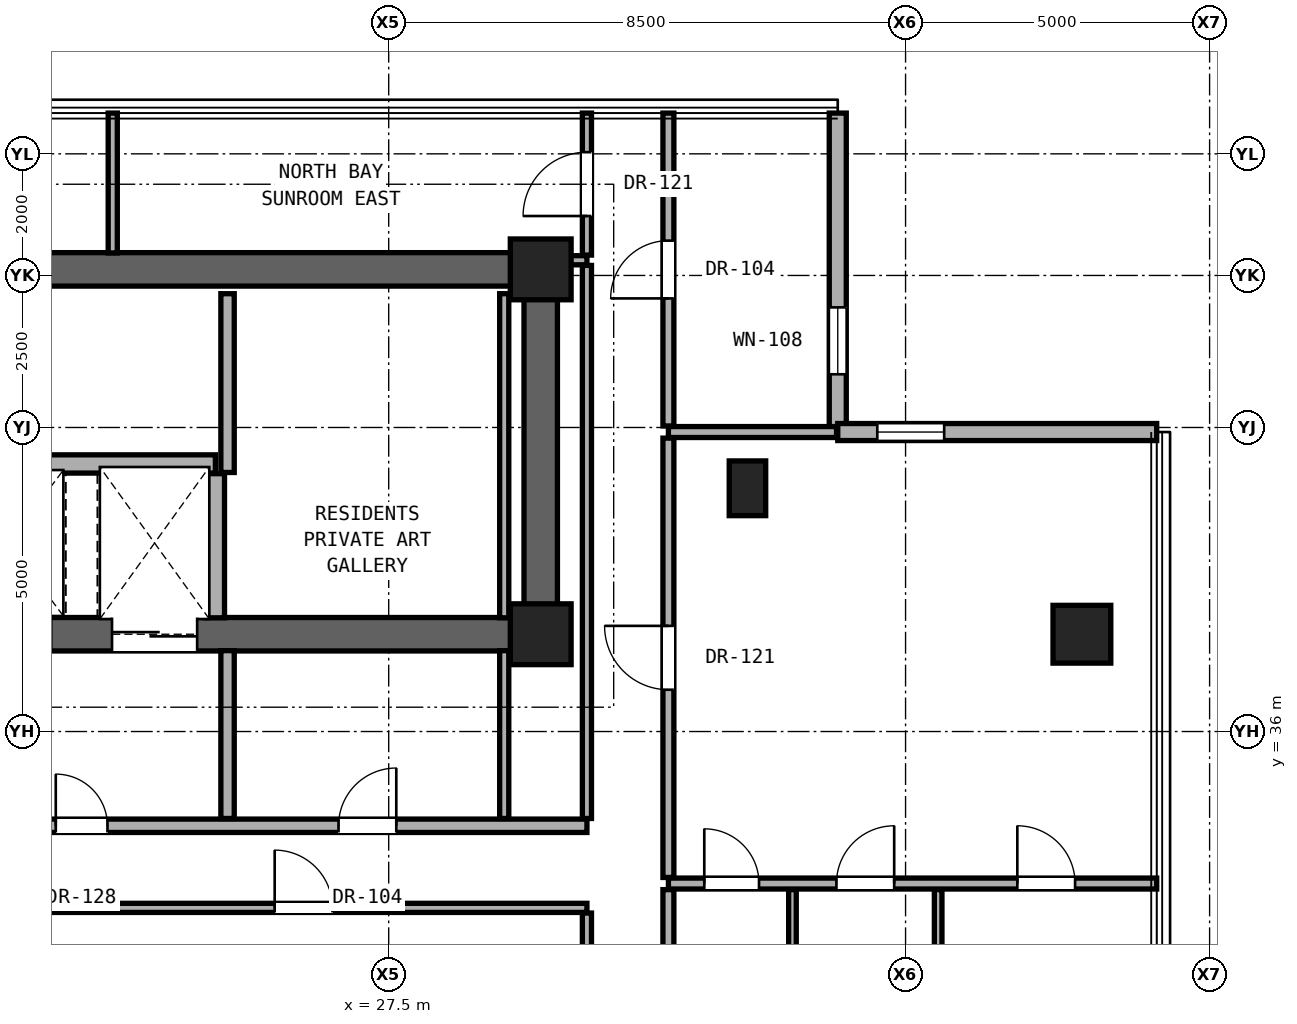
"""IFC4 building model, lengths in metres.
Left out: names, types, materials, properties, quantities, classifications, styles, units other than length and angle.
Written with IfcOpenShell. Run it as: python <this file> out.ifc"""

import sys

from ifc_helpers import new_model, si_unit, direction, frame, frame_2d, origin, origin_2d, place, context, subcontext, project, spatial, rectangle, hollow_rectangle, extrude, element, fill, save


model = new_model("IFC4")
c1 = context("Model", 3, precision=1e-05, world=origin(), true_north=direction((0.0, 1.0)))
c2 = subcontext(c1, "Body", "Model", "MODEL_VIEW")
j1 = project(units=[si_unit("LENGTHUNIT", "METRE"), si_unit("PLANEANGLEUNIT", "RADIAN")], contexts=[c1])
p1 = place(None, origin())
s1 = spatial("IfcSite", under=j1, at=p1, CompositionType="ELEMENT")
p2 = place(p1, origin())
s2 = spatial("IfcBuilding", under=s1, at=p2, CompositionType="ELEMENT")
p3 = place(p2, frame((0.0, 0.0, 154.4)))
s3 = spatial("IfcBuildingStorey", under=s2, at=p3, CompositionType="ELEMENT", Elevation=154.4)
for number, where, z_axis, x_axis in (
    (1, (30.0, 37.6, 0.0), (0.0, 0.0, 1.0), (1.0, 0.0, 0.0)),
    (2, (30.0, 43.6, 0.0), (0.0, 0.0, 1.0), (1.0, 0.0, 0.0)),
):
    element("IfcColumn", number, at=place(p3, frame(where, z_axis=z_axis, x_axis=x_axis)), inside=s3, PredefinedType="COLUMN", context=c2, shape_type="SweptSolid", body=[
        extrude(rectangle(XDim=1.0, YDim=1.0, at=origin_2d()), origin(), (0.0, 0.0, 1.0), 3.25),
    ])
p4 = place(p3, frame((38.9, 37.6, 0.0), z_axis=(0.0, 0.0, 1.0), x_axis=(1.0, 0.0, 0.0)))
e3 = element("IfcColumn", 3, at=p4, inside=s3, PredefinedType="COLUMN", context=c2, shape_type="SweptSolid", body=[
    extrude(hollow_rectangle(XDim=0.95, YDim=0.95, WallThickness=0.05, at=origin_2d()), origin(), (0.0, 0.0, 1.0), 3.25),
])
p5 = place(p3, frame((33.4, 40.0, 0.0), z_axis=(0.0, 0.0, 1.0), x_axis=(1.0, 0.0, 0.0)))
e4 = element("IfcColumn", 4, at=p5, inside=s3, PredefinedType="PILASTER", context=c2, shape_type="SweptSolid", body=[
    extrude(rectangle(XDim=0.6, YDim=0.9, at=origin_2d()), origin(), (0.0, 0.0, 1.0), 3.25),
])
p6 = place(p3, frame((11.0, 43.6, 0.0), z_axis=(0.0, 0.0, 1.0), x_axis=(1.0, 0.0, 0.0)))
e5 = element("IfcWall", 5, at=p6, inside=s3, PredefinedType="SHEAR", context=c2, shape_type="SweptSolid", body=[
    extrude(rectangle(XDim=19.0, YDim=0.55, at=frame_2d((9.5, 0.0))), origin(), (0.0, 0.0, 1.0), 3.05),
])
p7 = place(p3, frame((30.0, 37.6, 0.0), z_axis=(0.0, 0.0, 1.0), x_axis=(0.0, 1.0, 0.0)))
e6 = element("IfcWall", 6, at=p7, inside=s3, PredefinedType="SHEAR", context=c2, shape_type="SweptSolid", body=[
    extrude(rectangle(XDim=6.0, YDim=0.55, at=frame_2d((3.0, 0.0))), origin(), (0.0, 0.0, 1.0), 3.05),
])
p8 = place(p3, frame((11.0, 37.6, 0.0), z_axis=(0.0, 0.0, 1.0), x_axis=(1.0, 0.0, 0.0)))
e7 = element("IfcWall", 7, at=p8, inside=s3, PredefinedType="SHEAR", context=c2, shape_type="SweptSolid", body=[
    extrude(rectangle(XDim=19.0, YDim=0.55, at=frame_2d((9.5, 0.0))), origin(), (0.0, 0.0, 1.0), 3.05),
])
p9 = place(p8, frame((1.06, 0.0, 0.0)))
e8 = element("IfcOpeningElement", 8, at=p9, cuts=e7, PredefinedType="OPENING", context=c2, shape_type="SweptSolid", body=[
    extrude(rectangle(XDim=1.15, YDim=2.2, at=frame_2d((0.575, 1.1))), frame((0.0, 0.285, 0.0), z_axis=(0.0, -1.0, 0.0), x_axis=(1.0, 0.0, 0.0)), (0.0, 0.0, 1.0), 0.57),
])
p10 = place(p8, frame((9.55, 0.0, 0.0)))
e9 = element("IfcOpeningElement", 9, at=p10, cuts=e7, PredefinedType="OPENING", context=c2, shape_type="SweptSolid", body=[
    extrude(rectangle(XDim=1.4, YDim=2.35, at=frame_2d((0.7, 1.175))), frame((0.0, 0.285, 0.0), z_axis=(0.0, -1.0, 0.0), x_axis=(1.0, 0.0, 0.0)), (0.0, 0.0, 1.0), 0.57),
])
p11 = place(p8, frame((11.95, 0.0, 0.0)))
e10 = element("IfcOpeningElement", 10, at=p11, cuts=e7, PredefinedType="OPENING", context=c2, shape_type="SweptSolid", body=[
    extrude(rectangle(XDim=1.4, YDim=2.35, at=frame_2d((0.7, 1.175))), frame((0.0, 0.285, 0.0), z_axis=(0.0, -1.0, 0.0), x_axis=(1.0, 0.0, 0.0)), (0.0, 0.0, 1.0), 0.57),
])
p12 = place(p3, frame((34.885, 40.925, 0.0), z_axis=(0.0, 0.0, 1.0), x_axis=(0.0, 1.0, 0.0)))
e11 = element("IfcWall", 11, at=p12, inside=s3, PredefinedType="SOLIDWALL", context=c2, shape_type="SweptSolid", body=[
    extrude(rectangle(XDim=5.245, YDim=0.28, at=frame_2d((2.623, 0.0))), origin(), (0.0, 0.0, 1.0), 3.03),
])
p13 = place(p12, frame((0.95, 0.0, 0.85)))
e12 = element("IfcOpeningElement", 12, at=p13, cuts=e11, PredefinedType="OPENING", context=c2, shape_type="SweptSolid", body=[
    extrude(rectangle(XDim=1.1, YDim=2.0, at=frame_2d((0.55, 1.0))), frame((0.0, 0.15, 0.0), z_axis=(0.0, -1.0, 0.0), x_axis=(1.0, 0.0, 0.0)), (0.0, 0.0, 1.0), 0.3),
])
p14 = place(p3, frame((40.13, 40.925, 0.0), z_axis=(0.0, 0.0, 1.0), x_axis=(-1.0, 0.0, 0.0)))
e13 = element("IfcWall", 13, at=p14, inside=s3, PredefinedType="SOLIDWALL", context=c2, shape_type="SweptSolid", body=[
    extrude(rectangle(XDim=5.245, YDim=0.28, at=frame_2d((2.623, 0.0))), origin(), (0.0, 0.0, 1.0), 3.03),
])
p15 = place(p14, frame((3.495, 0.0, 0.85)))
e14 = element("IfcOpeningElement", 14, at=p15, cuts=e13, PredefinedType="OPENING", context=c2, shape_type="SweptSolid", body=[
    extrude(rectangle(XDim=1.1, YDim=2.0, at=frame_2d((0.55, 1.0))), frame((0.0, 0.15, 0.0), z_axis=(0.0, -1.0, 0.0), x_axis=(1.0, 0.0, 0.0)), (0.0, 0.0, 1.0), 0.3),
])
p16 = place(p3, frame((21.44, 33.1, 0.0), z_axis=(0.0, 0.0, 1.0), x_axis=(1.0, 0.0, 0.0)))
e15 = element("IfcWall", 15, at=p16, inside=s3, PredefinedType="PARTITIONING", context=c2, shape_type="SweptSolid", body=[
    extrude(rectangle(XDim=9.32, YDim=0.15, at=frame_2d((4.66, 0.0))), origin(), (0.0, 0.0, 1.0), 2.186),
])
p17 = place(p16, frame((4.185, 0.0, 0.0)))
e16 = element("IfcOpeningElement", 16, at=p17, cuts=e15, PredefinedType="OPENING", context=c2, shape_type="SweptSolid", body=[
    extrude(rectangle(XDim=0.95, YDim=2.15, at=frame_2d((0.475, 1.075))), frame((0.0, 0.085, 0.0), z_axis=(0.0, -1.0, 0.0), x_axis=(1.0, 0.0, 0.0)), (0.0, 0.0, 1.0), 0.17),
])
p18 = place(p3, frame((32.1, 33.5, 0.0), z_axis=(0.0, 0.0, 1.0), x_axis=(1.0, 0.0, 0.0)))
e17 = element("IfcWall", 17, at=p18, inside=s3, PredefinedType="PARTITIONING", context=c2, shape_type="SweptSolid", body=[
    extrude(rectangle(XDim=8.03, YDim=0.18, at=frame_2d((4.015, 0.0))), origin(), (0.0, 0.0, 1.0), 2.269),
])
p19 = place(p18, frame((5.738, 0.0, 0.0)))
e18 = element("IfcOpeningElement", 18, at=p19, cuts=e17, PredefinedType="OPENING", context=c2, shape_type="SweptSolid", body=[
    extrude(rectangle(XDim=0.95, YDim=2.15, at=frame_2d((0.475, 1.075))), frame((0.0, 0.1, 0.0), z_axis=(0.0, -1.0, 0.0), x_axis=(1.0, 0.0, 0.0)), (0.0, 0.0, 1.0), 0.2),
])
p20 = place(p18, frame((2.763, 0.0, 0.0)))
e19 = element("IfcOpeningElement", 19, at=p20, cuts=e17, PredefinedType="OPENING", context=c2, shape_type="SweptSolid", body=[
    extrude(rectangle(XDim=0.95, YDim=2.15, at=frame_2d((0.475, 1.075))), frame((0.0, 0.1, 0.0), z_axis=(0.0, -1.0, 0.0), x_axis=(1.0, 0.0, 0.0)), (0.0, 0.0, 1.0), 0.2),
])
p21 = place(p18, frame((0.59, 0.0, 0.0)))
e20 = element("IfcOpeningElement", 20, at=p21, cuts=e17, PredefinedType="OPENING", context=c2, shape_type="SweptSolid", body=[
    extrude(rectangle(XDim=0.9, YDim=2.1, at=frame_2d((0.45, 1.05))), frame((0.0, 0.1, 0.0), z_axis=(0.0, -1.0, 0.0), x_axis=(1.0, 0.0, 0.0)), (0.0, 0.0, 1.0), 0.2),
])
p22 = place(p3, frame((15.59, 34.45, 0.0), z_axis=(0.0, 0.0, 1.0), x_axis=(1.0, 0.0, 0.0)))
e21 = element("IfcWall", 21, at=p22, inside=s3, PredefinedType="SOLIDWALL", context=c2, shape_type="SweptSolid", body=[
    extrude(rectangle(XDim=15.17, YDim=0.22, at=frame_2d((7.585, 0.0))), origin(), (0.0, 0.0, 1.0), 2.186),
])
p23 = place(p22, frame((6.435, 0.0, 0.0)))
e22 = element("IfcOpeningElement", 22, at=p23, cuts=e21, PredefinedType="OPENING", context=c2, shape_type="SweptSolid", body=[
    extrude(rectangle(XDim=0.85, YDim=2.01, at=frame_2d((0.425, 1.005))), frame((0.0, 0.12, 0.0), z_axis=(0.0, -1.0, 0.0), x_axis=(1.0, 0.0, 0.0)), (0.0, 0.0, 1.0), 0.24),
])
p24 = place(p22, frame((11.085, 0.0, 0.0)))
e23 = element("IfcOpeningElement", 23, at=p24, cuts=e21, PredefinedType="OPENING", context=c2, shape_type="SweptSolid", body=[
    extrude(rectangle(XDim=0.95, YDim=2.15, at=frame_2d((0.475, 1.075))), frame((0.0, 0.12, 0.0), z_axis=(0.0, -1.0, 0.0), x_axis=(1.0, 0.0, 0.0)), (0.0, 0.0, 1.0), 0.24),
])
p25 = place(p22, frame((1.775, 0.0, 0.0)))
e24 = element("IfcOpeningElement", 24, at=p25, cuts=e21, PredefinedType="OPENING", context=c2, shape_type="SweptSolid", body=[
    extrude(rectangle(XDim=0.85, YDim=2.01, at=frame_2d((0.425, 1.005))), frame((0.0, 0.12, 0.0), z_axis=(0.0, -1.0, 0.0), x_axis=(1.0, 0.0, 0.0)), (0.0, 0.0, 1.0), 0.24),
])
p26 = place(p3, frame((20.25, 40.4, 0.0), z_axis=(0.0, 0.0, 1.0), x_axis=(1.0, 0.0, 0.0)))
e25 = element("IfcWall", 25, at=p26, inside=s3, PredefinedType="SOLIDWALL", context=c2, shape_type="SweptSolid", body=[
    extrude(rectangle(XDim=4.4, YDim=0.3, at=frame_2d((2.2, 0.0))), origin(), (0.0, 0.0, 1.0), 3.05),
])
p27 = place(p3, frame((32.1, 40.925, 0.0), z_axis=(0.0, 0.0, 1.0), x_axis=(1.0, 0.0, 0.0)))
e26 = element("IfcWall", 26, at=p27, inside=s3, PredefinedType="PARTITIONING", context=c2, shape_type="SweptSolid", body=[
    extrude(rectangle(XDim=2.765, YDim=0.18, at=frame_2d((1.382, 0.0))), origin(), (0.0, 0.0, 1.0), 3.05),
])
p28 = place(p3, frame((30.27, 43.75, 0.0), z_axis=(0.0, 0.0, 1.0), x_axis=(1.0, 0.0, 0.0)))
e27 = element("IfcWall", 27, at=p28, inside=s3, PredefinedType="PARTITIONING", context=c2, shape_type="SweptSolid", body=[
    extrude(rectangle(XDim=0.49, YDim=0.15, at=frame_2d((0.245, 0.0))), origin(), (0.0, 0.0, 1.0), 3.05),
])
p29 = place(p3, frame((22.962, 43.87, 0.0), z_axis=(0.0, 0.0, 1.0), x_axis=(0.0, 1.0, 0.0)))
e28 = element("IfcWall", 28, at=p29, inside=s3, PredefinedType="PARTITIONING", context=c2, shape_type="SweptSolid", body=[
    extrude(rectangle(XDim=2.3, YDim=0.15, at=frame_2d((1.15, 0.0))), origin(), (0.0, 0.0, 1.0), 3.05),
])
p30 = place(p3, frame((24.65, 37.87, 0.0), z_axis=(0.0, 0.0, 1.0), x_axis=(0.0, 1.0, 0.0)))
e29 = element("IfcWall", 29, at=p30, inside=s3, PredefinedType="SOLIDWALL", context=c2, shape_type="SweptSolid", body=[
    extrude(rectangle(XDim=2.37, YDim=0.3, at=frame_2d((1.185, 0.0))), origin(), (0.0, 0.0, 1.0), 3.05),
])
p31 = place(p3, frame((24.85, 34.57, 0.0), z_axis=(0.0, 0.0, 1.0), x_axis=(0.0, 1.0, 0.0)))
e30 = element("IfcWall", 30, at=p31, inside=s3, PredefinedType="SOLIDWALL", context=c2, shape_type="SweptSolid", body=[
    extrude(rectangle(XDim=2.76, YDim=0.22, at=frame_2d((1.38, 0.0))), origin(), (0.0, 0.0, 1.0), 3.05),
])
p32 = place(p3, frame((24.85, 40.26, 0.0), z_axis=(0.0, 0.0, 1.0), x_axis=(0.0, 1.0, 0.0)))
e31 = element("IfcWall", 31, at=p32, inside=s3, PredefinedType="SOLIDWALL", context=c2, shape_type="SweptSolid", body=[
    extrude(rectangle(XDim=2.94, YDim=0.22, at=frame_2d((1.47, 0.0))), origin(), (0.0, 0.0, 1.0), 3.05),
])
p33 = place(p3, frame((29.4, 34.57, 0.0), z_axis=(0.0, 0.0, 1.0), x_axis=(0.0, 1.0, 0.0)))
e32 = element("IfcWall", 32, at=p33, inside=s3, PredefinedType="PARTITIONING", context=c2, shape_type="SweptSolid", body=[
    extrude(rectangle(XDim=2.76, YDim=0.15, at=frame_2d((1.38, 0.0))), origin(), (0.0, 0.0, 1.0), 3.05),
])
p34 = place(p3, frame((29.4, 37.87, 0.0), z_axis=(0.0, 0.0, 1.0), x_axis=(0.0, 1.0, 0.0)))
e33 = element("IfcWall", 33, at=p34, inside=s3, PredefinedType="PARTITIONING", context=c2, shape_type="SweptSolid", body=[
    extrude(rectangle(XDim=5.33, YDim=0.15, at=frame_2d((2.665, 0.0))), origin(), (0.0, 0.0, 1.0), 3.05),
])
p35 = place(p3, frame((30.76, 27.485, 0.0), z_axis=(0.0, 0.0, 1.0), x_axis=(0.0, 1.0, 0.0)))
e34 = element("IfcWall", 34, at=p35, inside=s3, PredefinedType="PARTITIONING", context=c2, shape_type="SweptSolid", body=[
    extrude(rectangle(XDim=5.53, YDim=0.15, at=frame_2d((2.765, 0.0))), origin(), (0.0, 0.0, 1.0), 2.346),
])
p36 = place(p3, frame((30.76, 34.57, 0.0), z_axis=(0.0, 0.0, 1.0), x_axis=(0.0, 1.0, 0.0)))
e35 = element("IfcWall", 35, at=p36, inside=s3, PredefinedType="PARTITIONING", context=c2, shape_type="SweptSolid", body=[
    extrude(rectangle(XDim=9.095, YDim=0.15, at=frame_2d((4.547, 0.0))), origin(), (0.0, 0.0, 1.0), 2.442),
])
p37 = place(p3, frame((30.76, 43.835, 0.0), z_axis=(0.0, 0.0, 1.0), x_axis=(0.0, 1.0, 0.0)))
e36 = element("IfcWall", 36, at=p37, inside=s3, PredefinedType="PARTITIONING", context=c2, shape_type="SweptSolid", body=[
    extrude(rectangle(XDim=2.335, YDim=0.15, at=frame_2d((1.167, 0.0))), origin(), (0.0, 0.0, 1.0), 3.05),
])
p38 = place(p37, frame((0.643, 0.0, 0.0)))
e37 = element("IfcOpeningElement", 37, at=p38, cuts=e36, PredefinedType="OPENING", context=c2, shape_type="SweptSolid", body=[
    extrude(rectangle(XDim=1.05, YDim=2.2, at=frame_2d((0.525, 1.1))), frame((0.0, 0.085, 0.0), z_axis=(0.0, -1.0, 0.0), x_axis=(1.0, 0.0, 0.0)), (0.0, 0.0, 1.0), 0.17),
])
p39 = place(p3, frame((32.1, 31.272, 0.0), z_axis=(0.0, 0.0, 1.0), x_axis=(0.0, 1.0, 0.0)))
e38 = element("IfcWall", 38, at=p39, inside=s3, PredefinedType="PARTITIONING", context=c2, shape_type="SweptSolid", body=[
    extrude(rectangle(XDim=2.127, YDim=0.18, at=frame_2d((1.064, 0.0))), origin(), (0.0, 0.0, 1.0), 2.346),
])
p40 = place(p3, frame((32.1, 33.6, 0.0), z_axis=(0.0, 0.0, 1.0), x_axis=(0.0, 1.0, 0.0)))
e39 = element("IfcWall", 39, at=p40, inside=s3, PredefinedType="PARTITIONING", context=c2, shape_type="SweptSolid", body=[
    extrude(rectangle(XDim=7.225, YDim=0.18, at=frame_2d((3.612, 0.0))), origin(), (0.0, 0.0, 1.0), 2.442),
])
p41 = place(p40, frame((3.087, 0.0, 0.0)))
e40 = element("IfcOpeningElement", 40, at=p41, cuts=e39, PredefinedType="OPENING", context=c2, shape_type="SweptSolid", body=[
    extrude(rectangle(XDim=1.05, YDim=2.2, at=frame_2d((0.525, 1.1))), frame((0.0, 0.1, 0.0), z_axis=(0.0, -1.0, 0.0), x_axis=(1.0, 0.0, 0.0)), (0.0, 0.0, 1.0), 0.2),
])
p42 = place(p3, frame((32.1, 41.025, 0.0), z_axis=(0.0, 0.0, 1.0), x_axis=(0.0, 1.0, 0.0)))
e41 = element("IfcWall", 41, at=p42, inside=s3, PredefinedType="PARTITIONING", context=c2, shape_type="SweptSolid", body=[
    extrude(rectangle(XDim=5.145, YDim=0.18, at=frame_2d((2.573, 0.0))), origin(), (0.0, 0.0, 1.0), 3.05),
])
p43 = place(p42, frame((2.097, 0.0, 0.0)))
e42 = element("IfcOpeningElement", 42, at=p43, cuts=e41, PredefinedType="OPENING", context=c2, shape_type="SweptSolid", body=[
    extrude(rectangle(XDim=0.95, YDim=2.15, at=frame_2d((0.475, 1.075))), frame((0.0, 0.1, 0.0), z_axis=(0.0, -1.0, 0.0), x_axis=(1.0, 0.0, 0.0)), (0.0, 0.0, 1.0), 0.2),
])
for number, where, z_axis, x_axis in (
    (43, (34.14, 31.272, 0.0), (0.0, 0.0, 1.0), (0.0, 1.0, 0.0)),
    (44, (36.536, 31.272, 0.0), (0.0, 0.0, 1.0), (0.0, 1.0, 0.0)),
):
    element("IfcWall", number, at=place(p3, frame(where, z_axis=z_axis, x_axis=x_axis)), inside=s3, PredefinedType="PARTITIONING", context=c2, shape_type="SweptSolid", body=[
        extrude(rectangle(XDim=2.127, YDim=0.125, at=frame_2d((1.064, 0.0))), origin(), (0.0, 0.0, 1.0), 2.346),
    ])
p44 = place(p13, origin())
e45 = element("IfcWindow", 45, at=p44, inside=s3, PartitioningType="SINGLE_PANEL", PredefinedType="WINDOW", context=c2, shape_type="SweptSolid", body=[
    extrude(rectangle(XDim=1.1, YDim=2.0, at=frame_2d((0.55, 1.0))), frame((0.0, 0.03, 0.0), z_axis=(0.0, -1.0, 0.0), x_axis=(1.0, 0.0, 0.0)), (0.0, 0.0, 1.0), 0.06),
])
fill(e12, e45)
p45 = place(p15, origin())
e46 = element("IfcWindow", 46, at=p45, inside=s3, PartitioningType="SINGLE_PANEL", PredefinedType="WINDOW", context=c2, shape_type="SweptSolid", body=[
    extrude(rectangle(XDim=1.1, YDim=2.0, at=frame_2d((0.55, 1.0))), frame((0.0, 0.03, 0.0), z_axis=(0.0, -1.0, 0.0), x_axis=(1.0, 0.0, 0.0)), (0.0, 0.0, 1.0), 0.06),
])
fill(e14, e46)
p46 = place(p23, origin())
e47 = element("IfcDoor", 47, at=p46, inside=s3, OperationType="SINGLE_SWING_LEFT", PredefinedType="DOOR", context=c2, shape_type="SweptSolid", body=[
    extrude(rectangle(XDim=0.85, YDim=2.01, at=frame_2d((0.425, 1.005))), frame((0.0, 0.025, 0.0), z_axis=(0.0, -1.0, 0.0), x_axis=(1.0, 0.0, 0.0)), (0.0, 0.0, 1.0), 0.05),
])
fill(e22, e47)
p47 = place(p24, origin())
e48 = element("IfcDoor", 48, at=p47, inside=s3, OperationType="SINGLE_SWING_RIGHT", PredefinedType="DOOR", context=c2, shape_type="SweptSolid", body=[
    extrude(rectangle(XDim=0.95, YDim=2.15, at=frame_2d((0.475, 1.075))), frame((0.0, 0.025, 0.0), z_axis=(0.0, -1.0, 0.0), x_axis=(1.0, 0.0, 0.0)), (0.0, 0.0, 1.0), 0.05),
])
fill(e23, e48)
p48 = place(p41, origin())
e49 = element("IfcDoor", 49, at=p48, inside=s3, OperationType="SINGLE_SWING_RIGHT", PredefinedType="DOOR", context=c2, shape_type="SweptSolid", body=[
    extrude(rectangle(XDim=1.05, YDim=2.2, at=frame_2d((0.525, 1.1))), frame((0.0, 0.025, 0.0), z_axis=(0.0, -1.0, 0.0), x_axis=(1.0, 0.0, 0.0)), (0.0, 0.0, 1.0), 0.05),
])
fill(e40, e49)
p49 = place(p19, origin())
e50 = element("IfcDoor", 50, at=p49, inside=s3, OperationType="SINGLE_SWING_LEFT", PredefinedType="DOOR", context=c2, shape_type="SweptSolid", body=[
    extrude(rectangle(XDim=0.95, YDim=2.15, at=frame_2d((0.475, 1.075))), frame((0.0, 0.025, 0.0), z_axis=(0.0, -1.0, 0.0), x_axis=(1.0, 0.0, 0.0)), (0.0, 0.0, 1.0), 0.05),
])
fill(e18, e50)
p50 = place(p20, origin())
e51 = element("IfcDoor", 51, at=p50, inside=s3, OperationType="SINGLE_SWING_RIGHT", PredefinedType="DOOR", context=c2, shape_type="SweptSolid", body=[
    extrude(rectangle(XDim=0.95, YDim=2.15, at=frame_2d((0.475, 1.075))), frame((0.0, 0.025, 0.0), z_axis=(0.0, -1.0, 0.0), x_axis=(1.0, 0.0, 0.0)), (0.0, 0.0, 1.0), 0.05),
])
fill(e19, e51)
p51 = place(p21, origin())
e52 = element("IfcDoor", 52, at=p51, inside=s3, OperationType="SINGLE_SWING_LEFT", PredefinedType="DOOR", context=c2, shape_type="SweptSolid", body=[
    extrude(rectangle(XDim=0.9, YDim=2.1, at=frame_2d((0.45, 1.05))), frame((0.0, 0.025, 0.0), z_axis=(0.0, -1.0, 0.0), x_axis=(1.0, 0.0, 0.0)), (0.0, 0.0, 1.0), 0.05),
])
fill(e20, e52)
p52 = place(p17, origin())
e53 = element("IfcDoor", 53, at=p52, inside=s3, OperationType="SINGLE_SWING_LEFT", PredefinedType="DOOR", context=c2, shape_type="SweptSolid", body=[
    extrude(rectangle(XDim=0.95, YDim=2.15, at=frame_2d((0.475, 1.075))), frame((0.0, 0.025, 0.0), z_axis=(0.0, -1.0, 0.0), x_axis=(1.0, 0.0, 0.0)), (0.0, 0.0, 1.0), 0.05),
])
fill(e16, e53)
p53 = place(p38, origin())
e54 = element("IfcDoor", 54, at=p53, inside=s3, OperationType="SINGLE_SWING_LEFT", PredefinedType="DOOR", context=c2, shape_type="SweptSolid", body=[
    extrude(rectangle(XDim=1.05, YDim=2.2, at=frame_2d((0.525, 1.1))), frame((0.0, 0.025, 0.0), z_axis=(0.0, -1.0, 0.0), x_axis=(1.0, 0.0, 0.0)), (0.0, 0.0, 1.0), 0.05),
])
fill(e37, e54)
p54 = place(p43, origin())
e55 = element("IfcDoor", 55, at=p54, inside=s3, OperationType="SINGLE_SWING_LEFT", PredefinedType="DOOR", context=c2, shape_type="SweptSolid", body=[
    extrude(rectangle(XDim=0.95, YDim=2.15, at=frame_2d((0.475, 1.075))), frame((0.0, 0.025, 0.0), z_axis=(0.0, -1.0, 0.0), x_axis=(1.0, 0.0, 0.0)), (0.0, 0.0, 1.0), 0.05),
])
fill(e42, e55)
p55 = place(p11, origin())
e56 = element("IfcDoor", 56, at=p55, inside=s3, OperationType="DOUBLE_DOOR_SLIDING", PredefinedType="DOOR", context=c2, shape_type="SweptSolid", body=[
    extrude(rectangle(XDim=1.4, YDim=2.35, at=frame_2d((0.7, 1.175))), frame((0.0, 0.025, 0.0), z_axis=(0.0, -1.0, 0.0), x_axis=(1.0, 0.0, 0.0)), (0.0, 0.0, 1.0), 0.05),
])
fill(e10, e56)
save(model, sys.argv[1])
